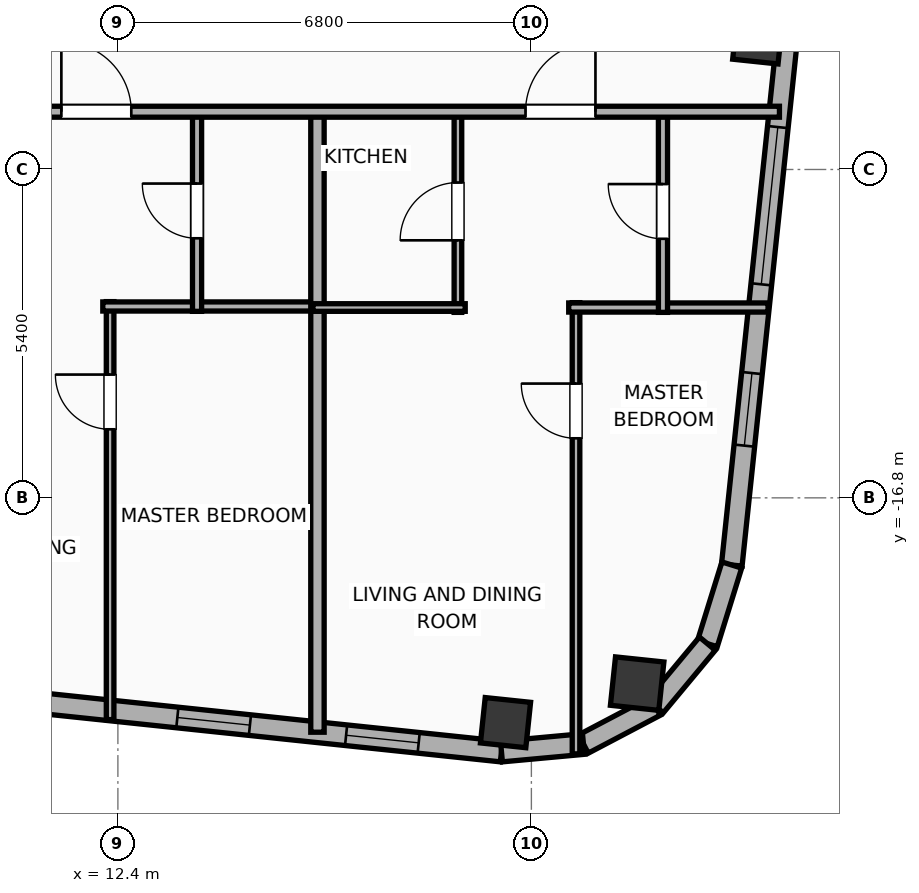
"""IFC4 building model, lengths in metres.
Left out: names, types, materials, properties, quantities, classifications, styles, units other than length and angle.
Written with IfcOpenShell. Run it as: python <this file> out.ifc"""

import sys

from ifc_helpers import new_model, si_unit, direction, frame, frame_2d, origin, origin_2d, place, context, subcontext, project, spatial, rectangle, hollow_rectangle, hollow_circle, extrude, element, fill, save


model = new_model("IFC4")
c1 = context("Model", 3, precision=1e-05, world=origin(), true_north=direction((0.0, 1.0)))
c2 = subcontext(c1, "Body", "Model", "MODEL_VIEW")
j1 = project(units=[si_unit("LENGTHUNIT", "METRE"), si_unit("PLANEANGLEUNIT", "RADIAN")], contexts=[c1])
p1 = place(None, origin())
s1 = spatial("IfcSite", under=j1, at=p1, CompositionType="ELEMENT")
p2 = place(p1, origin())
s2 = spatial("IfcBuilding", under=s1, at=p2, CompositionType="ELEMENT")
p3 = place(p2, frame((0.0, 0.0, 306.8)))
s3 = spatial("IfcBuildingStorey", under=s2, at=p3, CompositionType="ELEMENT", Elevation=306.8)
p4 = place(p3, frame((18.775, -20.497, 0.0), z_axis=(0.0, 0.0, 1.0), x_axis=(0.994521895368, -0.104528463268, 0.0)))
e1 = element("IfcColumn", 1, at=p4, inside=s3, PredefinedType="COLUMN", context=c2, shape_type="SweptSolid", body=[
    extrude(hollow_rectangle(XDim=0.75, YDim=0.75, WallThickness=0.025, at=origin_2d()), origin(), (0.0, 0.0, 1.0), 3.865),
])
p5 = place(p3, frame((20.939, -19.855, 0.0), z_axis=(0.0, 0.0, 1.0), x_axis=(0.994521895368, -0.104528463268, 0.0)))
e2 = element("IfcColumn", 2, at=p5, inside=s3, PredefinedType="COLUMN", context=c2, shape_type="SweptSolid", body=[
    extrude(hollow_circle(Radius=0.4, WallThickness=0.028, at=origin_2d()), origin(), (0.0, 0.0, 1.0), 3.865),
])
p6 = place(p3, frame((22.923, -9.252, 0.0), z_axis=(0.0, 0.0, 1.0), x_axis=(0.994521895368, -0.104528463268, 0.0)))
e3 = element("IfcColumn", 3, at=p6, inside=s3, PredefinedType="COLUMN", context=c2, shape_type="SweptSolid", body=[
    extrude(hollow_rectangle(XDim=0.75, YDim=0.75, WallThickness=0.025, at=origin_2d()), origin(), (0.0, 0.0, 1.0), 3.865),
])
p7 = place(p3, frame((18.708, -20.972, 0.0), z_axis=(0.0, 0.0, 1.0), x_axis=(-0.994521888554, 0.104528528102, 0.0)))
e4 = element("IfcWall", 4, at=p7, inside=s3, PredefinedType="ELEMENTEDWALL", context=c2, shape_type="SweptSolid", body=[
    extrude(rectangle(XDim=46.766, YDim=0.34, at=frame_2d((23.383, 0.0))), origin(), (0.0, 0.0, 1.0), 2.39),
])
p8 = place(p7, frame((23.733, 0.0, 0.65)))
e5 = element("IfcOpeningElement", 5, at=p8, cuts=e4, PredefinedType="OPENING", context=c2, shape_type="SweptSolid", body=[
    extrude(rectangle(XDim=2.6, YDim=1.45, at=frame_2d((1.3, 0.725))), frame((0.0, 0.18, 0.0), z_axis=(0.0, -1.0, 0.0), x_axis=(1.0, 0.0, 0.0)), (0.0, 0.0, 1.0), 0.36),
])
p9 = place(p7, frame((44.402, 0.0, 0.55)))
e6 = element("IfcOpeningElement", 6, at=p9, cuts=e4, PredefinedType="OPENING", context=c2, shape_type="SweptSolid", body=[
    extrude(rectangle(XDim=1.2, YDim=1.15, at=frame_2d((0.6, 0.575))), frame((0.0, 0.18, 0.0), z_axis=(0.0, -1.0, 0.0), x_axis=(1.0, 0.0, 0.0)), (0.0, 0.0, 1.0), 0.36),
])
p10 = place(p7, frame((39.54, 0.0, 0.55)))
e7 = element("IfcOpeningElement", 7, at=p10, cuts=e4, PredefinedType="OPENING", context=c2, shape_type="SweptSolid", body=[
    extrude(rectangle(XDim=1.2, YDim=1.15, at=frame_2d((0.6, 0.575))), frame((0.0, 0.18, 0.0), z_axis=(0.0, -1.0, 0.0), x_axis=(1.0, 0.0, 0.0)), (0.0, 0.0, 1.0), 0.36),
])
p11 = place(p7, frame((42.406, 0.0, 0.55)))
e8 = element("IfcOpeningElement", 8, at=p11, cuts=e4, PredefinedType="OPENING", context=c2, shape_type="SweptSolid", body=[
    extrude(rectangle(XDim=1.2, YDim=1.15, at=frame_2d((0.6, 0.575))), frame((0.0, 0.18, 0.0), z_axis=(0.0, -1.0, 0.0), x_axis=(1.0, 0.0, 0.0)), (0.0, 0.0, 1.0), 0.36),
])
p12 = place(p7, frame((34.933, 0.0, 0.55)))
e9 = element("IfcOpeningElement", 9, at=p12, cuts=e4, PredefinedType="OPENING", context=c2, shape_type="SweptSolid", body=[
    extrude(rectangle(XDim=1.2, YDim=1.15, at=frame_2d((0.6, 0.575))), frame((0.0, 0.18, 0.0), z_axis=(0.0, -1.0, 0.0), x_axis=(1.0, 0.0, 0.0)), (0.0, 0.0, 1.0), 0.36),
])
p13 = place(p7, frame((28.631, 0.0, 0.55)))
e10 = element("IfcOpeningElement", 10, at=p13, cuts=e4, PredefinedType="OPENING", context=c2, shape_type="SweptSolid", body=[
    extrude(rectangle(XDim=1.2, YDim=1.15, at=frame_2d((0.6, 0.575))), frame((0.0, 0.18, 0.0), z_axis=(0.0, -1.0, 0.0), x_axis=(1.0, 0.0, 0.0)), (0.0, 0.0, 1.0), 0.36),
])
p14 = place(p7, frame((30.896, 0.0, 0.55)))
e11 = element("IfcOpeningElement", 11, at=p14, cuts=e4, PredefinedType="OPENING", context=c2, shape_type="SweptSolid", body=[
    extrude(rectangle(XDim=1.2, YDim=1.15, at=frame_2d((0.6, 0.575))), frame((0.0, 0.18, 0.0), z_axis=(0.0, -1.0, 0.0), x_axis=(1.0, 0.0, 0.0)), (0.0, 0.0, 1.0), 0.36),
])
p15 = place(p7, frame((7.501, 0.0, 0.55)))
e12 = element("IfcOpeningElement", 12, at=p15, cuts=e4, PredefinedType="OPENING", context=c2, shape_type="SweptSolid", body=[
    extrude(rectangle(XDim=1.2, YDim=1.15, at=frame_2d((0.6, 0.575))), frame((0.0, 0.18, 0.0), z_axis=(0.0, -1.0, 0.0), x_axis=(1.0, 0.0, 0.0)), (0.0, 0.0, 1.0), 0.36),
])
p16 = place(p7, frame((4.159, 0.0, 0.55)))
e13 = element("IfcOpeningElement", 13, at=p16, cuts=e4, PredefinedType="OPENING", context=c2, shape_type="SweptSolid", body=[
    extrude(rectangle(XDim=1.2, YDim=1.15, at=frame_2d((0.6, 0.575))), frame((0.0, 0.18, 0.0), z_axis=(0.0, -1.0, 0.0), x_axis=(1.0, 0.0, 0.0)), (0.0, 0.0, 1.0), 0.36),
])
p17 = place(p7, frame((1.369, 0.0, 0.55)))
e14 = element("IfcOpeningElement", 14, at=p17, cuts=e4, PredefinedType="OPENING", context=c2, shape_type="SweptSolid", body=[
    extrude(rectangle(XDim=1.2, YDim=1.15, at=frame_2d((0.6, 0.575))), frame((0.0, 0.18, 0.0), z_axis=(0.0, -1.0, 0.0), x_axis=(1.0, 0.0, 0.0)), (0.0, 0.0, 1.0), 0.36),
])
p18 = place(p7, frame((20.254, 0.0, 0.55)))
e15 = element("IfcOpeningElement", 15, at=p18, cuts=e4, PredefinedType="OPENING", context=c2, shape_type="SweptSolid", body=[
    extrude(rectangle(XDim=1.2, YDim=1.15, at=frame_2d((0.6, 0.575))), frame((0.0, 0.18, 0.0), z_axis=(0.0, -1.0, 0.0), x_axis=(1.0, 0.0, 0.0)), (0.0, 0.0, 1.0), 0.36),
])
p19 = place(p7, frame((16.172, 0.0, 0.55)))
e16 = element("IfcOpeningElement", 16, at=p19, cuts=e4, PredefinedType="OPENING", context=c2, shape_type="SweptSolid", body=[
    extrude(rectangle(XDim=1.2, YDim=1.15, at=frame_2d((0.6, 0.575))), frame((0.0, 0.18, 0.0), z_axis=(0.0, -1.0, 0.0), x_axis=(1.0, 0.0, 0.0)), (0.0, 0.0, 1.0), 0.36),
])
p20 = place(p7, frame((12.11, 0.0, 0.55)))
e17 = element("IfcOpeningElement", 17, at=p20, cuts=e4, PredefinedType="OPENING", context=c2, shape_type="SweptSolid", body=[
    extrude(rectangle(XDim=1.2, YDim=1.15, at=frame_2d((0.6, 0.575))), frame((0.0, 0.18, 0.0), z_axis=(0.0, -1.0, 0.0), x_axis=(1.0, 0.0, 0.0)), (0.0, 0.0, 1.0), 0.36),
])
p21 = place(p3, frame((25.67, 12.296, 0.0), z_axis=(0.0, 0.0, 1.0), x_axis=(-0.104533282919, -0.994521388791, 0.0)))
e18 = element("IfcWall", 18, at=p21, inside=s3, PredefinedType="ELEMENTEDWALL", context=c2, shape_type="SweptSolid", body=[
    extrude(rectangle(XDim=30.366, YDim=0.34, at=frame_2d((15.183, 0.0))), origin(), (0.0, 0.0, 1.0), 2.39),
])
p22 = place(p21, frame((5.442, 0.0, 0.65)))
e19 = element("IfcOpeningElement", 19, at=p22, cuts=e18, PredefinedType="OPENING", context=c2, shape_type="SweptSolid", body=[
    extrude(rectangle(XDim=2.6, YDim=1.45, at=frame_2d((1.3, 0.725))), frame((0.0, 0.18, 0.0), z_axis=(0.0, -1.0, 0.0), x_axis=(1.0, 0.0, 0.0)), (0.0, 0.0, 1.0), 0.36),
])
p23 = place(p21, frame((23.125, 0.0, 0.65)))
e20 = element("IfcOpeningElement", 20, at=p23, cuts=e18, PredefinedType="OPENING", context=c2, shape_type="SweptSolid", body=[
    extrude(rectangle(XDim=2.6, YDim=1.45, at=frame_2d((1.3, 0.725))), frame((0.0, 0.18, 0.0), z_axis=(0.0, -1.0, 0.0), x_axis=(1.0, 0.0, 0.0)), (0.0, 0.0, 1.0), 0.36),
])
p24 = place(p21, frame((27.192, 0.0, 0.55)))
e21 = element("IfcOpeningElement", 21, at=p24, cuts=e18, PredefinedType="OPENING", context=c2, shape_type="SweptSolid", body=[
    extrude(rectangle(XDim=1.2, YDim=1.15, at=frame_2d((0.6, 0.575))), frame((0.0, 0.18, 0.0), z_axis=(0.0, -1.0, 0.0), x_axis=(1.0, 0.0, 0.0)), (0.0, 0.0, 1.0), 0.36),
])
p25 = place(p21, frame((18.005, 0.0, 0.55)))
e22 = element("IfcOpeningElement", 22, at=p25, cuts=e18, PredefinedType="OPENING", context=c2, shape_type="SweptSolid", body=[
    extrude(rectangle(XDim=1.2, YDim=1.15, at=frame_2d((0.6, 0.575))), frame((0.0, 0.18, 0.0), z_axis=(0.0, -1.0, 0.0), x_axis=(1.0, 0.0, 0.0)), (0.0, 0.0, 1.0), 0.36),
])
p26 = place(p3, frame((22.496, -17.905, 0.0), z_axis=(0.0, 0.0, 1.0), x_axis=(-0.296416228123, -0.955058856671, 0.0)))
e23 = element("IfcWall", 23, at=p26, inside=s3, PredefinedType="ELEMENTEDWALL", context=c2, shape_type="SweptSolid", body=[
    extrude(rectangle(XDim=1.354, YDim=0.34, at=frame_2d((0.677, 0.0))), origin(), (0.0, 0.0, 1.0), 3.5),
])
p27 = place(p3, frame((22.094, -19.198, 0.0), z_axis=(0.0, 0.0, 1.0), x_axis=(-0.639501603217, -0.768789762863, 0.0)))
e24 = element("IfcWall", 24, at=p27, inside=s3, PredefinedType="ELEMENTEDWALL", context=c2, shape_type="SweptSolid", body=[
    extrude(rectangle(XDim=1.337, YDim=0.34, at=frame_2d((0.668, 0.0))), origin(), (0.0, 0.0, 1.0), 3.5),
])
p28 = place(p3, frame((21.24, -20.226, 0.0), z_axis=(0.0, 0.0, 1.0), x_axis=(-0.884922182678, -0.465738908193, 0.0)))
e25 = element("IfcWall", 25, at=p28, inside=s3, PredefinedType="ELEMENTEDWALL", context=c2, shape_type="SweptSolid", body=[
    extrude(rectangle(XDim=1.337, YDim=0.34, at=frame_2d((0.668, 0.0))), origin(), (0.0, 0.0, 1.0), 2.39),
])
p29 = place(p3, frame((20.056, -20.848, 0.0), z_axis=(0.0, 0.0, 1.0), x_axis=(-0.995813013343, -0.091413579172, 0.0)))
e26 = element("IfcWall", 26, at=p29, inside=s3, PredefinedType="ELEMENTEDWALL", context=c2, shape_type="SweptSolid", body=[
    extrude(rectangle(XDim=1.354, YDim=0.34, at=frame_2d((0.677, 0.0))), origin(), (0.0, 0.0, 1.0), 2.39),
])
p30 = place(p3, frame((12.272, -20.447, 0.0), z_axis=(0.0, 0.0, 1.0), x_axis=(0.0, 1.0, 0.0)))
e27 = element("IfcWall", 27, at=p30, inside=s3, PredefinedType="PARTITIONING", context=c2, shape_type="SweptSolid", body=[
    extrude(rectangle(XDim=6.874, YDim=0.125, at=frame_2d((3.437, 0.0))), origin(), (0.0, 0.0, 1.0), 3.5),
])
p31 = place(p30, frame((4.774, 0.0, 0.0)))
e28 = element("IfcOpeningElement", 28, at=p31, cuts=e27, PredefinedType="OPENING", context=c2, shape_type="SweptSolid", body=[
    extrude(rectangle(XDim=0.9, YDim=2.05, at=frame_2d((0.45, 1.025))), frame((0.0, 0.073, 0.0), z_axis=(0.0, -1.0, 0.0), x_axis=(1.0, 0.0, 0.0)), (0.0, 0.0, 1.0), 0.145),
])
p32 = place(p3, frame((12.152, -13.653, 0.0), z_axis=(0.0, 0.0, 1.0), x_axis=(1.0, 0.0, 0.0)))
e29 = element("IfcWall", 29, at=p32, inside=s3, PredefinedType="PLUMBINGWALL", context=c2, shape_type="SweptSolid", body=[
    extrude(rectangle(XDim=3.605, YDim=0.15, at=frame_2d((1.802, 0.0))), origin(), (0.0, 0.0, 1.0), 3.5),
])
p33 = place(p3, frame((13.702, -13.733, 0.0), z_axis=(0.0, 0.0, 1.0), x_axis=(0.0, 1.0, 0.0)))
e30 = element("IfcWall", 30, at=p33, inside=s3, PredefinedType="PLUMBINGWALL", context=c2, shape_type="SweptSolid", body=[
    extrude(rectangle(XDim=3.303, YDim=0.15, at=frame_2d((1.651, 0.0))), origin(), (0.0, 0.0, 1.0), 3.5),
])
p34 = place(p33, frame((1.201, 0.0, 0.0)))
e31 = element("IfcOpeningElement", 31, at=p34, cuts=e30, PredefinedType="OPENING", context=c2, shape_type="SweptSolid", body=[
    extrude(rectangle(XDim=0.9, YDim=2.05, at=frame_2d((0.45, 1.025))), frame((0.0, 0.085, 0.0), z_axis=(0.0, -1.0, 0.0), x_axis=(1.0, 0.0, 0.0)), (0.0, 0.0, 1.0), 0.17),
])
p35 = place(p3, frame((15.682, -20.654, 0.0), z_axis=(0.0, 0.0, 1.0), x_axis=(0.0, 1.0, 0.0)))
e32 = element("IfcWall", 32, at=p35, inside=s3, PredefinedType="PARTITIONING", context=c2, shape_type="SweptSolid", body=[
    extrude(rectangle(XDim=10.284, YDim=0.22, at=frame_2d((5.142, 0.0))), origin(), (0.0, 0.0, 1.0), 3.5),
])
p36 = place(p3, frame((19.934, -21.01, 0.0), z_axis=(0.0, 0.0, 1.0), x_axis=(0.0, 1.0, 0.0)))
e33 = element("IfcWall", 33, at=p36, inside=s3, PredefinedType="PARTITIONING", context=c2, shape_type="SweptSolid", body=[
    extrude(rectangle(XDim=7.42, YDim=0.125, at=frame_2d((3.71, 0.0))), origin(), (0.0, 0.0, 1.0), 2.39),
])
p37 = place(p36, frame((5.189, 0.0, 0.0)))
e34 = element("IfcOpeningElement", 34, at=p37, cuts=e33, PredefinedType="OPENING", context=c2, shape_type="SweptSolid", body=[
    extrude(rectangle(XDim=0.9, YDim=2.05, at=frame_2d((0.45, 1.025))), frame((0.0, 0.073, 0.0), z_axis=(0.0, -1.0, 0.0), x_axis=(1.0, 0.0, 0.0)), (0.0, 0.0, 1.0), 0.145),
])
p38 = place(p3, frame((19.814, -13.67, 0.0), z_axis=(0.0, 0.0, 1.0), x_axis=(1.0, 0.0, 0.0)))
e35 = element("IfcWall", 35, at=p38, inside=s3, PredefinedType="PLUMBINGWALL", context=c2, shape_type="SweptSolid", body=[
    extrude(rectangle(XDim=3.278, YDim=0.15, at=frame_2d((1.639, 0.0))), origin(), (0.0, 0.0, 1.0), 3.5),
])
p39 = place(p3, frame((17.992, -13.75, 0.0), z_axis=(0.0, 0.0, 1.0), x_axis=(0.0, 1.0, 0.0)))
e36 = element("IfcWall", 36, at=p39, inside=s3, PredefinedType="PARTITIONING", context=c2, shape_type="SweptSolid", body=[
    extrude(rectangle(XDim=3.32, YDim=0.125, at=frame_2d((1.66, 0.0))), origin(), (0.0, 0.0, 1.0), 3.5),
])
p40 = place(p39, frame((1.185, 0.0, 0.0)))
e37 = element("IfcOpeningElement", 37, at=p40, cuts=e36, PredefinedType="OPENING", context=c2, shape_type="SweptSolid", body=[
    extrude(rectangle(XDim=0.95, YDim=2.05, at=frame_2d((0.475, 1.025))), frame((0.0, 0.073, 0.0), z_axis=(0.0, -1.0, 0.0), x_axis=(1.0, 0.0, 0.0)), (0.0, 0.0, 1.0), 0.145),
])
p41 = place(p3, frame((15.607, -13.67, 0.0), z_axis=(0.0, 0.0, 1.0), x_axis=(1.0, 0.0, 0.0)))
e38 = element("IfcWall", 38, at=p41, inside=s3, PredefinedType="PARTITIONING", context=c2, shape_type="SweptSolid", body=[
    extrude(rectangle(XDim=2.505, YDim=0.125, at=frame_2d((1.252, 0.0))), origin(), (0.0, 0.0, 1.0), 3.5),
])
p42 = place(p3, frame((21.364, -13.75, 0.0), z_axis=(0.0, 0.0, 1.0), x_axis=(0.0, 1.0, 0.0)))
e39 = element("IfcWall", 39, at=p42, inside=s3, PredefinedType="PLUMBINGWALL", context=c2, shape_type="SweptSolid", body=[
    extrude(rectangle(XDim=3.32, YDim=0.15, at=frame_2d((1.66, 0.0))), origin(), (0.0, 0.0, 1.0), 3.5),
])
p43 = place(p42, frame((1.21, 0.0, 0.0)))
e40 = element("IfcOpeningElement", 40, at=p43, cuts=e39, PredefinedType="OPENING", context=c2, shape_type="SweptSolid", body=[
    extrude(rectangle(XDim=0.9, YDim=2.05, at=frame_2d((0.45, 1.025))), frame((0.0, 0.085, 0.0), z_axis=(0.0, -1.0, 0.0), x_axis=(1.0, 0.0, 0.0)), (0.0, 0.0, 1.0), 0.17),
])
p44 = place(p3, frame((8.08, -10.45, 0.0), z_axis=(0.0, 0.0, 1.0), x_axis=(1.0, 0.0, 0.0)))
e41 = element("IfcWall", 41, at=p44, inside=s3, PredefinedType="PARTITIONING", context=c2, shape_type="SweptSolid", body=[
    extrude(rectangle(XDim=15.199, YDim=0.18, at=frame_2d((7.6, 0.0))), origin(), (0.0, 0.0, 1.0), 3.5),
])
p45 = place(p44, frame((3.39, 0.0, 0.0)))
e42 = element("IfcOpeningElement", 42, at=p45, cuts=e41, PredefinedType="OPENING", context=c2, shape_type="SweptSolid", body=[
    extrude(rectangle(XDim=1.15, YDim=2.05, at=frame_2d((0.575, 1.025))), frame((0.0, 0.1, 0.0), z_axis=(0.0, -1.0, 0.0), x_axis=(1.0, 0.0, 0.0)), (0.0, 0.0, 1.0), 0.2),
])
p46 = place(p44, frame((11.024, 0.0, 0.0)))
e43 = element("IfcOpeningElement", 43, at=p46, cuts=e41, PredefinedType="OPENING", context=c2, shape_type="SweptSolid", body=[
    extrude(rectangle(XDim=1.15, YDim=2.05, at=frame_2d((0.575, 1.025))), frame((0.0, 0.1, 0.0), z_axis=(0.0, -1.0, 0.0), x_axis=(1.0, 0.0, 0.0)), (0.0, 0.0, 1.0), 0.2),
])
p47 = place(p23, origin())
e44 = element("IfcWindow", 44, at=p47, inside=s3, PartitioningType="SINGLE_PANEL", PredefinedType="WINDOW", context=c2, shape_type="SweptSolid", body=[
    extrude(rectangle(XDim=2.6, YDim=1.45, at=frame_2d((1.3, 0.725))), frame((0.0, 0.03, 0.0), z_axis=(0.0, -1.0, 0.0), x_axis=(1.0, 0.0, 0.0)), (0.0, 0.0, 1.0), 0.06),
])
fill(e20, e44)
p48 = place(p16, origin())
e45 = element("IfcWindow", 45, at=p48, inside=s3, PartitioningType="SINGLE_PANEL", PredefinedType="WINDOW", context=c2, shape_type="SweptSolid", body=[
    extrude(rectangle(XDim=1.2, YDim=1.15, at=frame_2d((0.6, 0.575))), frame((0.0, 0.03, 0.0), z_axis=(0.0, -1.0, 0.0), x_axis=(1.0, 0.0, 0.0)), (0.0, 0.0, 1.0), 0.06),
])
fill(e13, e45)
p49 = place(p17, origin())
e46 = element("IfcWindow", 46, at=p49, inside=s3, PartitioningType="SINGLE_PANEL", PredefinedType="WINDOW", context=c2, shape_type="SweptSolid", body=[
    extrude(rectangle(XDim=1.2, YDim=1.15, at=frame_2d((0.6, 0.575))), frame((0.0, 0.03, 0.0), z_axis=(0.0, -1.0, 0.0), x_axis=(1.0, 0.0, 0.0)), (0.0, 0.0, 1.0), 0.06),
])
fill(e14, e46)
p50 = place(p24, origin())
e47 = element("IfcWindow", 47, at=p50, inside=s3, PartitioningType="SINGLE_PANEL", PredefinedType="WINDOW", context=c2, shape_type="SweptSolid", body=[
    extrude(rectangle(XDim=1.2, YDim=1.15, at=frame_2d((0.6, 0.575))), frame((0.0, 0.03, 0.0), z_axis=(0.0, -1.0, 0.0), x_axis=(1.0, 0.0, 0.0)), (0.0, 0.0, 1.0), 0.06),
])
fill(e21, e47)
p51 = place(p31, origin())
e48 = element("IfcDoor", 48, at=p51, inside=s3, OperationType="SINGLE_SWING_RIGHT", PredefinedType="DOOR", context=c2, shape_type="SweptSolid", body=[
    extrude(rectangle(XDim=0.9, YDim=2.05, at=frame_2d((0.45, 1.025))), frame((0.0, 0.025, 0.0), z_axis=(0.0, -1.0, 0.0), x_axis=(1.0, 0.0, 0.0)), (0.0, 0.0, 1.0), 0.05),
])
fill(e28, e48)
p52 = place(p34, origin())
e49 = element("IfcDoor", 49, at=p52, inside=s3, OperationType="SINGLE_SWING_RIGHT", PredefinedType="DOOR", context=c2, shape_type="SweptSolid", body=[
    extrude(rectangle(XDim=0.9, YDim=2.05, at=frame_2d((0.45, 1.025))), frame((0.0, 0.025, 0.0), z_axis=(0.0, -1.0, 0.0), x_axis=(1.0, 0.0, 0.0)), (0.0, 0.0, 1.0), 0.05),
])
fill(e31, e49)
p53 = place(p37, origin())
e50 = element("IfcDoor", 50, at=p53, inside=s3, OperationType="SINGLE_SWING_RIGHT", PredefinedType="DOOR", context=c2, shape_type="SweptSolid", body=[
    extrude(rectangle(XDim=0.9, YDim=2.05, at=frame_2d((0.45, 1.025))), frame((0.0, 0.025, 0.0), z_axis=(0.0, -1.0, 0.0), x_axis=(1.0, 0.0, 0.0)), (0.0, 0.0, 1.0), 0.05),
])
fill(e34, e50)
p54 = place(p40, origin())
e51 = element("IfcDoor", 51, at=p54, inside=s3, OperationType="SINGLE_SWING_LEFT", PredefinedType="DOOR", context=c2, shape_type="SweptSolid", body=[
    extrude(rectangle(XDim=0.95, YDim=2.05, at=frame_2d((0.475, 1.025))), frame((0.0, 0.025, 0.0), z_axis=(0.0, -1.0, 0.0), x_axis=(1.0, 0.0, 0.0)), (0.0, 0.0, 1.0), 0.05),
])
fill(e37, e51)
p55 = place(p43, origin())
e52 = element("IfcDoor", 52, at=p55, inside=s3, OperationType="SINGLE_SWING_RIGHT", PredefinedType="DOOR", context=c2, shape_type="SweptSolid", body=[
    extrude(rectangle(XDim=0.9, YDim=2.05, at=frame_2d((0.45, 1.025))), frame((0.0, 0.025, 0.0), z_axis=(0.0, -1.0, 0.0), x_axis=(1.0, 0.0, 0.0)), (0.0, 0.0, 1.0), 0.05),
])
fill(e40, e52)
p56 = place(p45, origin())
e53 = element("IfcDoor", 53, at=p56, inside=s3, OperationType="SINGLE_SWING_LEFT", PredefinedType="DOOR", context=c2, shape_type="SweptSolid", body=[
    extrude(rectangle(XDim=1.15, YDim=2.05, at=frame_2d((0.575, 1.025))), frame((0.0, 0.025, 0.0), z_axis=(0.0, -1.0, 0.0), x_axis=(1.0, 0.0, 0.0)), (0.0, 0.0, 1.0), 0.05),
])
fill(e42, e53)
p57 = place(p46, origin())
e54 = element("IfcDoor", 54, at=p57, inside=s3, OperationType="SINGLE_SWING_RIGHT", PredefinedType="DOOR", context=c2, shape_type="SweptSolid", body=[
    extrude(rectangle(XDim=1.15, YDim=2.05, at=frame_2d((0.575, 1.025))), frame((0.0, 0.025, 0.0), z_axis=(0.0, -1.0, 0.0), x_axis=(1.0, 0.0, 0.0)), (0.0, 0.0, 1.0), 0.05),
])
fill(e43, e54)
save(model, sys.argv[1])
